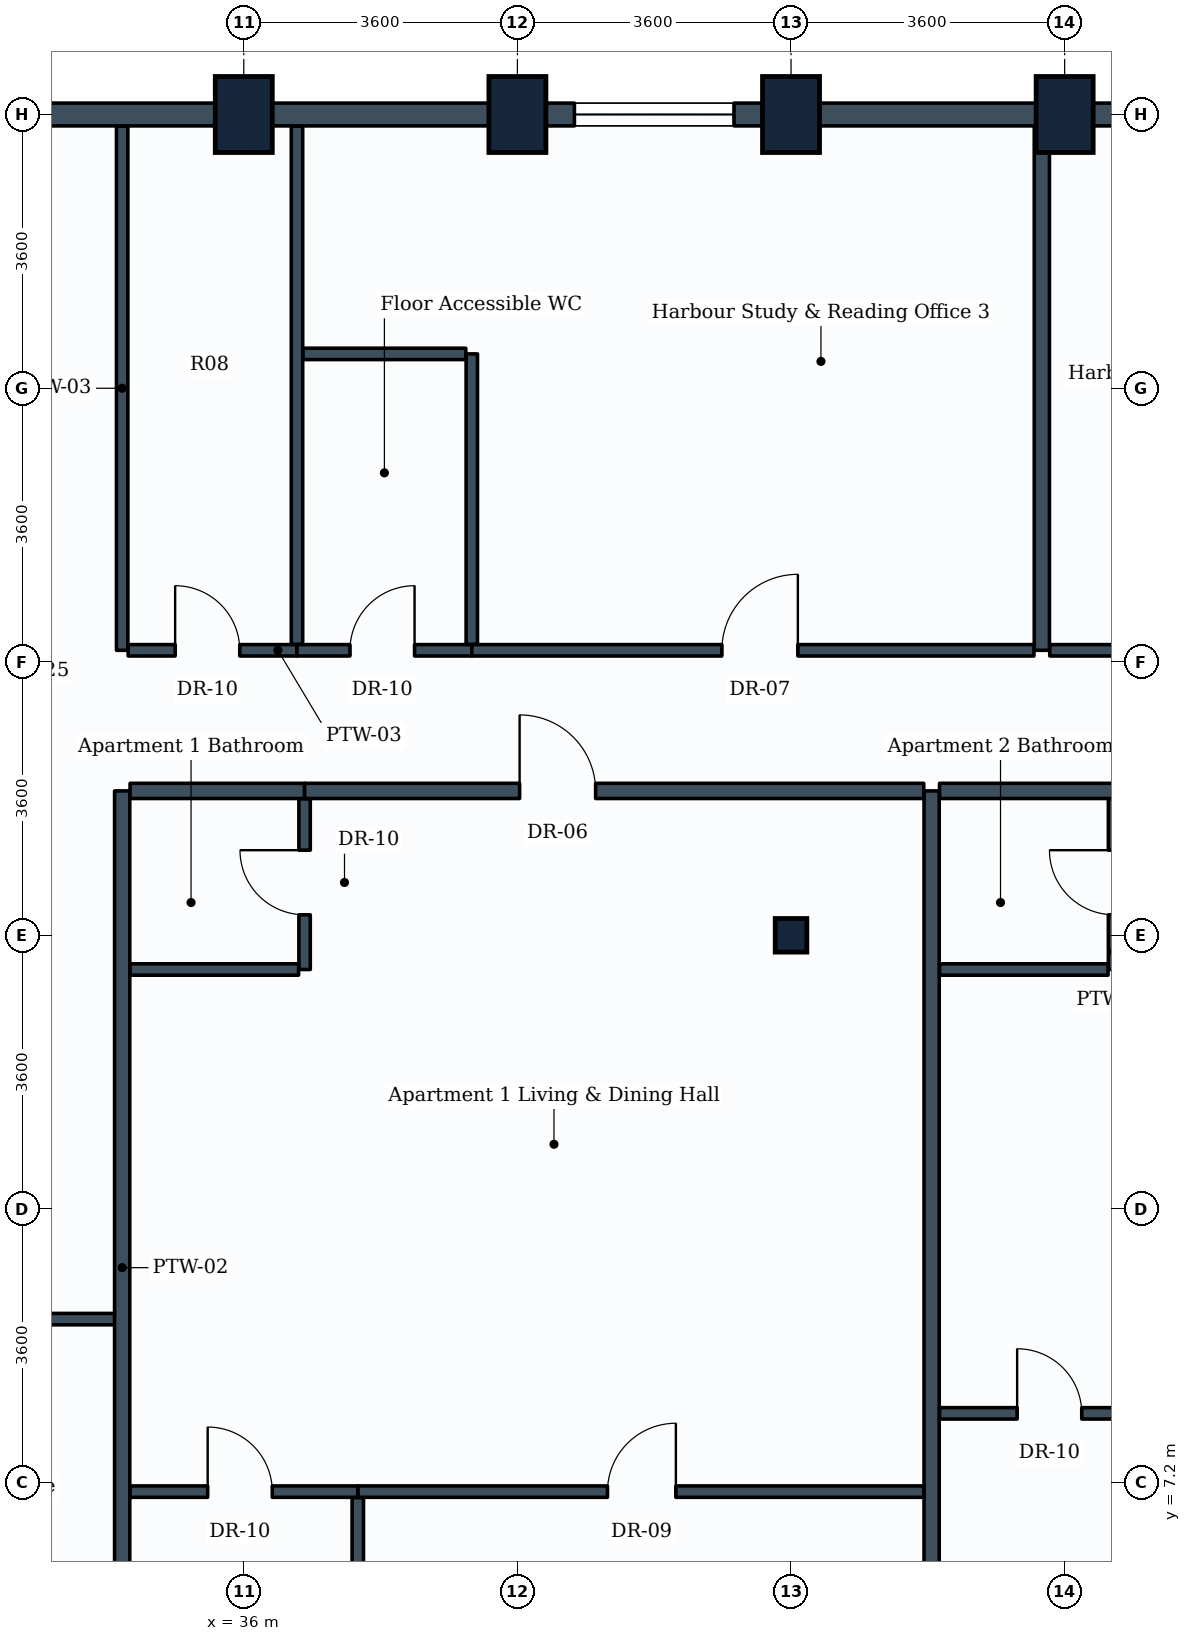
"""IFC4 building model, lengths in metres.
Left out: names, types, materials, properties, quantities, classifications, styles, units other than length and angle.
Written with IfcOpenShell. Run it as: python <this file> out.ifc"""

import sys

from ifc_helpers import new_model, si_unit, direction, frame, frame_2d, origin, origin_2d, place, context, subcontext, project, spatial, rectangle, i_section, extrude, element, fill, save


model = new_model("IFC4")
c1 = context("Model", 3, precision=1e-05, world=origin(), true_north=direction((0.0, 1.0)))
c2 = subcontext(c1, "Body", "Model", "MODEL_VIEW")
j1 = project(units=[si_unit("LENGTHUNIT", "METRE"), si_unit("PLANEANGLEUNIT", "RADIAN")], contexts=[c1])
p1 = place(None, origin())
s1 = spatial("IfcSite", under=j1, at=p1, CompositionType="ELEMENT")
p2 = place(p1, origin())
s2 = spatial("IfcBuilding", under=s1, at=p2, CompositionType="ELEMENT")
p3 = place(p2, frame((0.0, 0.0, 161.8)))
s3 = spatial("IfcBuildingStorey", under=s2, at=p3, CompositionType="ELEMENT", Elevation=161.8)
for number, where, z_axis, x_axis in (
    (1, (36.0, 25.2, 0.0), (0.0, 0.0, 1.0), (1.0, 0.0, 0.0)),
    (2, (39.6, 25.2, 0.0), (0.0, 0.0, 1.0), (1.0, 0.0, 0.0)),
):
    element("IfcColumn", number, at=place(p3, frame(where, z_axis=z_axis, x_axis=x_axis)), inside=s3, PredefinedType="COLUMN", context=c2, shape_type="SweptSolid", body=[
        extrude(rectangle(XDim=0.75, YDim=1.0, at=origin_2d()), origin(), (0.0, 0.0, 1.0), 3.8),
    ])
p4 = place(p3, frame((43.2, 14.4, 0.0), z_axis=(0.0, 0.0, 1.0), x_axis=(1.0, 0.0, 0.0)))
e3 = element("IfcColumn", 3, at=p4, inside=s3, PredefinedType="COLUMN", context=c2, shape_type="SweptSolid", body=[
    extrude(i_section(OverallWidth=0.416, OverallDepth=0.442, WebThickness=0.025, FlangeThickness=0.041, FilletRadius=0.015, at=origin_2d()), origin(), (0.0, 0.0, 1.0), 3.8),
])
for number, where, z_axis, x_axis in (
    (4, (43.2, 25.2, 0.0), (0.0, 0.0, 1.0), (1.0, 0.0, 0.0)),
    (5, (46.8, 25.2, 0.0), (0.0, 0.0, 1.0), (1.0, 0.0, 0.0)),
):
    element("IfcColumn", number, at=place(p3, frame(where, z_axis=z_axis, x_axis=x_axis)), inside=s3, PredefinedType="COLUMN", context=c2, shape_type="SweptSolid", body=[
        extrude(rectangle(XDim=0.75, YDim=1.0, at=origin_2d()), origin(), (0.0, 0.0, 1.0), 3.8),
    ])
p5 = place(p3, frame((46.8, 25.2, 0.0), z_axis=(0.0, 0.0, 1.0), x_axis=(1.0, 0.0, 0.0)))
e6 = element("IfcWall", 6, at=p5, inside=s3, PredefinedType="STANDARD", context=c2, shape_type="SweptSolid", body=[
    extrude(rectangle(XDim=3.6, YDim=0.3, at=frame_2d((1.8, 0.0))), origin(), (0.0, 0.0, 1.0), 2.93),
])
p6 = place(p5, frame((0.725, 0.0, 0.85)))
e7 = element("IfcOpeningElement", 7, at=p6, cuts=e6, PredefinedType="OPENING", context=c2, shape_type="SweptSolid", body=[
    extrude(rectangle(XDim=2.1, YDim=1.35, at=frame_2d((1.05, 0.675))), frame((0.0, 0.16, 0.0), z_axis=(0.0, -1.0, 0.0), x_axis=(1.0, 0.0, 0.0)), (0.0, 0.0, 1.0), 0.32),
])
p7 = place(p3, frame((43.2, 25.2, 0.0), z_axis=(0.0, 0.0, 1.0), x_axis=(1.0, 0.0, 0.0)))
e8 = element("IfcWall", 8, at=p7, inside=s3, PredefinedType="STANDARD", context=c2, shape_type="SweptSolid", body=[
    extrude(rectangle(XDim=3.6, YDim=0.3, at=frame_2d((1.8, 0.0))), origin(), (0.0, 0.0, 1.0), 2.93),
])
p8 = place(p3, frame((39.6, 25.2, 0.0), z_axis=(0.0, 0.0, 1.0), x_axis=(1.0, 0.0, 0.0)))
e9 = element("IfcWall", 9, at=p8, inside=s3, PredefinedType="STANDARD", context=c2, shape_type="SweptSolid", body=[
    extrude(rectangle(XDim=3.6, YDim=0.3, at=frame_2d((1.8, 0.0))), origin(), (0.0, 0.0, 1.0), 2.93),
])
p9 = place(p8, frame((0.75, 0.0, 0.85)))
e10 = element("IfcOpeningElement", 10, at=p9, cuts=e9, PredefinedType="OPENING", context=c2, shape_type="SweptSolid", body=[
    extrude(rectangle(XDim=2.1, YDim=1.35, at=frame_2d((1.05, 0.675))), frame((0.0, 0.16, 0.0), z_axis=(0.0, -1.0, 0.0), x_axis=(1.0, 0.0, 0.0)), (0.0, 0.0, 1.0), 0.32),
])
for number, where, z_axis, x_axis in (
    (11, (36.0, 25.2, 0.0), (0.0, 0.0, 1.0), (1.0, 0.0, 0.0)),
    (12, (32.4, 25.2, 0.0), (0.0, 0.0, 1.0), (1.0, 0.0, 0.0)),
):
    element("IfcWall", number, at=place(p3, frame(where, z_axis=z_axis, x_axis=x_axis)), inside=s3, PredefinedType="STANDARD", context=c2, shape_type="SweptSolid", body=[
        extrude(rectangle(XDim=3.6, YDim=0.3, at=frame_2d((1.8, 0.0))), origin(), (0.0, 0.0, 1.0), 2.93),
    ])
p10 = place(p3, frame((34.4, 18.15, 0.0), z_axis=(0.0, 0.0, 1.0), x_axis=(0.0, 1.0, 0.0)))
e13 = element("IfcWall", 13, at=p10, inside=s3, PredefinedType="PARTITIONING", context=c2, shape_type="SweptSolid", body=[
    extrude(rectangle(XDim=6.896, YDim=0.15, at=frame_2d((3.448, 0.0))), origin(), (0.0, 0.0, 1.0), 2.93),
])
p11 = place(p3, frame((34.479, 18.15, 0.0), z_axis=(0.0, 0.0, 1.0), x_axis=(1.0, 0.0, 0.0)))
e14 = element("IfcWall", 14, at=p11, inside=s3, PredefinedType="PARTITIONING", context=c2, shape_type="SweptSolid", body=[
    extrude(rectangle(XDim=2.221, YDim=0.15, at=frame_2d((1.11, 0.0))), origin(), (0.0, 0.0, 1.0), 3.17),
])
p12 = place(p11, frame((0.618, 0.0, 0.0)))
e15 = element("IfcOpeningElement", 15, at=p12, cuts=e14, PredefinedType="OPENING", context=c2, shape_type="SweptSolid", body=[
    extrude(rectangle(XDim=0.85, YDim=2.1, at=frame_2d((0.425, 1.05))), frame((0.0, 0.085, 0.0), z_axis=(0.0, -1.0, 0.0), x_axis=(1.0, 0.0, 0.0)), (0.0, 0.0, 1.0), 0.17),
])
p13 = place(p3, frame((36.7, 18.229, 0.0), z_axis=(0.0, 0.0, 1.0), x_axis=(0.0, 1.0, 0.0)))
e16 = element("IfcWall", 16, at=p13, inside=s3, PredefinedType="PARTITIONING", context=c2, shape_type="SweptSolid", body=[
    extrude(rectangle(XDim=6.817, YDim=0.15, at=frame_2d((3.408, 0.0))), origin(), (0.0, 0.0, 1.0), 2.93),
])
p14 = place(p3, frame((36.7, 18.15, 0.0), z_axis=(0.0, 0.0, 1.0), x_axis=(1.0, 0.0, 0.0)))
e17 = element("IfcWall", 17, at=p14, inside=s3, PredefinedType="PARTITIONING", context=c2, shape_type="SweptSolid", body=[
    extrude(rectangle(XDim=2.3, YDim=0.15, at=frame_2d((1.15, 0.0))), origin(), (0.0, 0.0, 1.0), 3.17),
])
p15 = place(p14, frame((0.697, 0.0, 0.0)))
e18 = element("IfcOpeningElement", 18, at=p15, cuts=e17, PredefinedType="OPENING", context=c2, shape_type="SweptSolid", body=[
    extrude(rectangle(XDim=0.85, YDim=2.1, at=frame_2d((0.425, 1.05))), frame((0.0, 0.085, 0.0), z_axis=(0.0, -1.0, 0.0), x_axis=(1.0, 0.0, 0.0)), (0.0, 0.0, 1.0), 0.17),
])
p16 = place(p3, frame((39.0, 18.229, 0.0), z_axis=(0.0, 0.0, 1.0), x_axis=(0.0, 1.0, 0.0)))
e19 = element("IfcWall", 19, at=p16, inside=s3, PredefinedType="PARTITIONING", context=c2, shape_type="SweptSolid", body=[
    extrude(rectangle(XDim=3.821, YDim=0.15, at=frame_2d((1.911, 0.0))), origin(), (0.0, 0.0, 1.0), 3.17),
])
p17 = place(p3, frame((36.779, 22.05, 0.0), z_axis=(0.0, 0.0, 1.0), x_axis=(1.0, 0.0, 0.0)))
e20 = element("IfcWall", 20, at=p17, inside=s3, PredefinedType="PARTITIONING", context=c2, shape_type="SweptSolid", body=[
    extrude(rectangle(XDim=2.142, YDim=0.15, at=frame_2d((1.071, 0.0))), origin(), (0.0, 0.0, 1.0), 3.535),
])
p18 = place(p3, frame((28.879, 9.35, 0.0), z_axis=(0.0, 0.0, 1.0), x_axis=(1.0, 0.0, 0.0)))
e21 = element("IfcWall", 21, at=p18, inside=s3, PredefinedType="PARTITIONING", context=c2, shape_type="SweptSolid", body=[
    extrude(rectangle(XDim=5.521, YDim=0.15, at=frame_2d((2.76, 0.0))), origin(), (0.0, 0.0, 1.0), 3.535),
])
p19 = place(p18, frame((0.36, 0.0, 0.0)))
e22 = element("IfcOpeningElement", 22, at=p19, cuts=e21, PredefinedType="OPENING", context=c2, shape_type="SweptSolid", body=[
    extrude(rectangle(XDim=1.0, YDim=2.1, at=frame_2d((0.5, 1.05))), frame((0.0, 0.085, 0.0), z_axis=(0.0, -1.0, 0.0), x_axis=(1.0, 0.0, 0.0)), (0.0, 0.0, 1.0), 0.17),
])
for number, where, z_axis, x_axis in (
    (23, (34.4, 3.754, 0.0), (0.0, 0.0, 1.0), (0.0, 1.0, 0.0)),
    (24, (45.05, 3.754, 0.0), (0.0, 0.0, 1.0), (0.0, 1.0, 0.0)),
):
    element("IfcWall", number, at=place(p3, frame(where, z_axis=z_axis, x_axis=x_axis)), inside=s3, PredefinedType="PARTITIONING", context=c2, shape_type="SweptSolid", body=[
        extrude(rectangle(XDim=12.546, YDim=0.2, at=frame_2d((6.273, 0.0))), origin(), (0.0, 0.0, 1.0), 2.93),
    ])
p20 = place(p3, frame((34.504, 16.3, 0.0), z_axis=(0.0, 0.0, 1.0), x_axis=(1.0, 0.0, 0.0)))
e25 = element("IfcWall", 25, at=p20, inside=s3, PredefinedType="PARTITIONING", context=c2, shape_type="SweptSolid", body=[
    extrude(rectangle(XDim=2.296, YDim=0.2, at=frame_2d((1.148, 0.0))), origin(), (0.0, 0.0, 1.0), 3.22),
])
p21 = place(p3, frame((36.8, 13.95, 0.0), z_axis=(0.0, 0.0, 1.0), x_axis=(0.0, 1.0, 0.0)))
e26 = element("IfcWall", 26, at=p21, inside=s3, PredefinedType="PARTITIONING", context=c2, shape_type="SweptSolid", body=[
    extrude(rectangle(XDim=2.246, YDim=0.15, at=frame_2d((1.123, 0.0))), origin(), (0.0, 0.0, 1.0), 3.17),
])
p22 = place(p21, frame((0.72, 0.0, 0.0)))
e27 = element("IfcOpeningElement", 27, at=p22, cuts=e26, PredefinedType="OPENING", context=c2, shape_type="SweptSolid", body=[
    extrude(rectangle(XDim=0.85, YDim=2.1, at=frame_2d((0.425, 1.05))), frame((0.0, 0.085, 0.0), z_axis=(0.0, -1.0, 0.0), x_axis=(1.0, 0.0, 0.0)), (0.0, 0.0, 1.0), 0.17),
])
p23 = place(p3, frame((34.504, 13.95, 0.0), z_axis=(0.0, 0.0, 1.0), x_axis=(1.0, 0.0, 0.0)))
e28 = element("IfcWall", 28, at=p23, inside=s3, PredefinedType="PARTITIONING", context=c2, shape_type="SweptSolid", body=[
    extrude(rectangle(XDim=2.217, YDim=0.15, at=frame_2d((1.108, 0.0))), origin(), (0.0, 0.0, 1.0), 3.22),
])
p24 = place(p3, frame((36.8, 16.3, 0.0), z_axis=(0.0, 0.0, 1.0), x_axis=(1.0, 0.0, 0.0)))
e29 = element("IfcWall", 29, at=p24, inside=s3, PredefinedType="PARTITIONING", context=c2, shape_type="SweptSolid", body=[
    extrude(rectangle(XDim=8.146, YDim=0.2, at=frame_2d((4.073, 0.0))), origin(), (0.0, 0.0, 1.0), 3.17),
])
p25 = place(p24, frame((2.829, 0.0, 0.0)))
e30 = element("IfcOpeningElement", 30, at=p25, cuts=e29, PredefinedType="OPENING", context=c2, shape_type="SweptSolid", body=[
    extrude(rectangle(XDim=1.0, YDim=2.1, at=frame_2d((0.5, 1.05))), frame((0.0, 0.11, 0.0), z_axis=(0.0, -1.0, 0.0), x_axis=(1.0, 0.0, 0.0)), (0.0, 0.0, 1.0), 0.22),
])
p26 = place(p3, frame((37.5, 7.08, 0.0), z_axis=(0.0, 0.0, 1.0), x_axis=(1.0, 0.0, 0.0)))
e31 = element("IfcWall", 31, at=p26, inside=s3, PredefinedType="PARTITIONING", context=c2, shape_type="SweptSolid", body=[
    extrude(rectangle(XDim=7.446, YDim=0.15, at=frame_2d((3.723, 0.0))), origin(), (0.0, 0.0, 1.0), 3.17),
])
p27 = place(p26, frame((3.285, 0.0, 0.0)))
e32 = element("IfcOpeningElement", 32, at=p27, cuts=e31, PredefinedType="OPENING", context=c2, shape_type="SweptSolid", body=[
    extrude(rectangle(XDim=0.9, YDim=2.1, at=frame_2d((0.45, 1.05))), frame((0.0, 0.085, 0.0), z_axis=(0.0, -1.0, 0.0), x_axis=(1.0, 0.0, 0.0)), (0.0, 0.0, 1.0), 0.17),
])
p28 = place(p3, frame((34.504, 7.08, 0.0), z_axis=(0.0, 0.0, 1.0), x_axis=(1.0, 0.0, 0.0)))
e33 = element("IfcWall", 33, at=p28, inside=s3, PredefinedType="PARTITIONING", context=c2, shape_type="SweptSolid", body=[
    extrude(rectangle(XDim=2.996, YDim=0.15, at=frame_2d((1.498, 0.0))), origin(), (0.0, 0.0, 1.0), 3.17),
])
p29 = place(p28, frame((1.021, 0.0, 0.0)))
e34 = element("IfcOpeningElement", 34, at=p29, cuts=e33, PredefinedType="OPENING", context=c2, shape_type="SweptSolid", body=[
    extrude(rectangle(XDim=0.85, YDim=2.1, at=frame_2d((0.425, 1.05))), frame((0.0, 0.085, 0.0), z_axis=(0.0, -1.0, 0.0), x_axis=(1.0, 0.0, 0.0)), (0.0, 0.0, 1.0), 0.17),
])
p30 = place(p3, frame((37.5, 3.754, 0.0), z_axis=(0.0, 0.0, 1.0), x_axis=(0.0, 1.0, 0.0)))
e35 = element("IfcWall", 35, at=p30, inside=s3, PredefinedType="PARTITIONING", context=c2, shape_type="SweptSolid", body=[
    extrude(rectangle(XDim=3.247, YDim=0.15, at=frame_2d((1.624, 0.0))), origin(), (0.0, 0.0, 1.0), 2.93),
])
p31 = place(p3, frame((45.154, 16.3, 0.0), z_axis=(0.0, 0.0, 1.0), x_axis=(1.0, 0.0, 0.0)))
e36 = element("IfcWall", 36, at=p31, inside=s3, PredefinedType="PARTITIONING", context=c2, shape_type="SweptSolid", body=[
    extrude(rectangle(XDim=2.296, YDim=0.2, at=frame_2d((1.148, 0.0))), origin(), (0.0, 0.0, 1.0), 3.17),
])
p32 = place(p3, frame((47.45, 13.95, 0.0), z_axis=(0.0, 0.0, 1.0), x_axis=(0.0, 1.0, 0.0)))
e37 = element("IfcWall", 37, at=p32, inside=s3, PredefinedType="PARTITIONING", context=c2, shape_type="SweptSolid", body=[
    extrude(rectangle(XDim=2.246, YDim=0.15, at=frame_2d((1.123, 0.0))), origin(), (0.0, 0.0, 1.0), 3.17),
])
p33 = place(p32, frame((0.72, 0.0, 0.0)))
e38 = element("IfcOpeningElement", 38, at=p33, cuts=e37, PredefinedType="OPENING", context=c2, shape_type="SweptSolid", body=[
    extrude(rectangle(XDim=0.85, YDim=2.1, at=frame_2d((0.425, 1.05))), frame((0.0, 0.085, 0.0), z_axis=(0.0, -1.0, 0.0), x_axis=(1.0, 0.0, 0.0)), (0.0, 0.0, 1.0), 0.17),
])
p34 = place(p3, frame((45.154, 13.95, 0.0), z_axis=(0.0, 0.0, 1.0), x_axis=(1.0, 0.0, 0.0)))
e39 = element("IfcWall", 39, at=p34, inside=s3, PredefinedType="PARTITIONING", context=c2, shape_type="SweptSolid", body=[
    extrude(rectangle(XDim=2.217, YDim=0.15, at=frame_2d((1.108, 0.0))), origin(), (0.0, 0.0, 1.0), 3.17),
])
p35 = place(p3, frame((45.154, 8.11, 0.0), z_axis=(0.0, 0.0, 1.0), x_axis=(1.0, 0.0, 0.0)))
e40 = element("IfcWall", 40, at=p35, inside=s3, PredefinedType="PARTITIONING", context=c2, shape_type="SweptSolid", body=[
    extrude(rectangle(XDim=2.996, YDim=0.15, at=frame_2d((1.498, 0.0))), origin(), (0.0, 0.0, 1.0), 3.17),
])
p36 = place(p35, frame((1.021, 0.0, 0.0)))
e41 = element("IfcOpeningElement", 41, at=p36, cuts=e40, PredefinedType="OPENING", context=c2, shape_type="SweptSolid", body=[
    extrude(rectangle(XDim=0.85, YDim=2.1, at=frame_2d((0.425, 1.05))), frame((0.0, 0.085, 0.0), z_axis=(0.0, -1.0, 0.0), x_axis=(1.0, 0.0, 0.0)), (0.0, 0.0, 1.0), 0.17),
])
p37 = place(p3, frame((46.5, 18.15, 0.0), z_axis=(0.0, 0.0, 1.0), x_axis=(0.0, 1.0, 0.0)))
e42 = element("IfcWall", 42, at=p37, inside=s3, PredefinedType="PARTITIONING", context=c2, shape_type="SweptSolid", body=[
    extrude(rectangle(XDim=6.896, YDim=0.2, at=frame_2d((3.448, 0.0))), origin(), (0.0, 0.0, 1.0), 2.93),
])
p38 = place(p3, frame((39.0, 18.15, 0.0), z_axis=(0.0, 0.0, 1.0), x_axis=(1.0, 0.0, 0.0)))
e43 = element("IfcWall", 43, at=p38, inside=s3, PredefinedType="PARTITIONING", context=c2, shape_type="SweptSolid", body=[
    extrude(rectangle(XDim=7.396, YDim=0.15, at=frame_2d((3.698, 0.0))), origin(), (0.0, 0.0, 1.0), 3.17),
])
p39 = place(p38, frame((3.29, 0.0, 0.0)))
e44 = element("IfcOpeningElement", 44, at=p39, cuts=e43, PredefinedType="OPENING", context=c2, shape_type="SweptSolid", body=[
    extrude(rectangle(XDim=1.0, YDim=2.1, at=frame_2d((0.5, 1.05))), frame((0.0, 0.085, 0.0), z_axis=(0.0, -1.0, 0.0), x_axis=(1.0, 0.0, 0.0)), (0.0, 0.0, 1.0), 0.17),
])
p40 = place(p3, frame((46.604, 18.15, 0.0), z_axis=(0.0, 0.0, 1.0), x_axis=(1.0, 0.0, 0.0)))
e45 = element("IfcWall", 45, at=p40, inside=s3, PredefinedType="PARTITIONING", context=c2, shape_type="SweptSolid", body=[
    extrude(rectangle(XDim=7.242, YDim=0.15, at=frame_2d((3.621, 0.0))), origin(), (0.0, 0.0, 1.0), 2.93),
])
p41 = place(p40, frame((3.186, 0.0, 0.0)))
e46 = element("IfcOpeningElement", 46, at=p41, cuts=e45, PredefinedType="OPENING", context=c2, shape_type="SweptSolid", body=[
    extrude(rectangle(XDim=1.0, YDim=2.1, at=frame_2d((0.5, 1.05))), frame((0.0, 0.085, 0.0), z_axis=(0.0, -1.0, 0.0), x_axis=(1.0, 0.0, 0.0)), (0.0, 0.0, 1.0), 0.17),
])
p42 = place(p9, origin())
e47 = element("IfcWindow", 47, at=p42, inside=s3, PartitioningType="SINGLE_PANEL", PredefinedType="WINDOW", context=c2, shape_type="SweptSolid", body=[
    extrude(rectangle(XDim=2.1, YDim=1.35, at=frame_2d((1.05, 0.675))), frame((0.0, 0.03, 0.0), z_axis=(0.0, -1.0, 0.0), x_axis=(1.0, 0.0, 0.0)), (0.0, 0.0, 1.0), 0.06),
])
fill(e10, e47)
p43 = place(p12, origin())
e48 = element("IfcDoor", 48, at=p43, inside=s3, OperationType="SINGLE_SWING_LEFT", PredefinedType="DOOR", context=c2, shape_type="SweptSolid", body=[
    extrude(rectangle(XDim=0.85, YDim=2.1, at=frame_2d((0.425, 1.05))), frame((0.0, 0.025, 0.0), z_axis=(0.0, -1.0, 0.0), x_axis=(1.0, 0.0, 0.0)), (0.0, 0.0, 1.0), 0.05),
])
fill(e15, e48)
p44 = place(p15, origin())
e49 = element("IfcDoor", 49, at=p44, inside=s3, OperationType="SINGLE_SWING_RIGHT", PredefinedType="DOOR", context=c2, shape_type="SweptSolid", body=[
    extrude(rectangle(XDim=0.85, YDim=2.1, at=frame_2d((0.425, 1.05))), frame((0.0, 0.025, 0.0), z_axis=(0.0, -1.0, 0.0), x_axis=(1.0, 0.0, 0.0)), (0.0, 0.0, 1.0), 0.05),
])
fill(e18, e49)
p45 = place(p22, origin())
e50 = element("IfcDoor", 50, at=p45, inside=s3, OperationType="SINGLE_SWING_RIGHT", PredefinedType="DOOR", context=c2, shape_type="SweptSolid", body=[
    extrude(rectangle(XDim=0.85, YDim=2.1, at=frame_2d((0.425, 1.05))), frame((0.0, 0.025, 0.0), z_axis=(0.0, -1.0, 0.0), x_axis=(1.0, 0.0, 0.0)), (0.0, 0.0, 1.0), 0.05),
])
fill(e27, e50)
p46 = place(p25, origin())
e51 = element("IfcDoor", 51, at=p46, inside=s3, OperationType="SINGLE_SWING_LEFT", PredefinedType="DOOR", context=c2, shape_type="SweptSolid", body=[
    extrude(rectangle(XDim=1.0, YDim=2.1, at=frame_2d((0.5, 1.05))), frame((0.0, 0.025, 0.0), z_axis=(0.0, -1.0, 0.0), x_axis=(1.0, 0.0, 0.0)), (0.0, 0.0, 1.0), 0.05),
])
fill(e30, e51)
p47 = place(p27, origin())
e52 = element("IfcDoor", 52, at=p47, inside=s3, OperationType="SINGLE_SWING_RIGHT", PredefinedType="DOOR", context=c2, shape_type="SweptSolid", body=[
    extrude(rectangle(XDim=0.9, YDim=2.1, at=frame_2d((0.45, 1.05))), frame((0.0, 0.025, 0.0), z_axis=(0.0, -1.0, 0.0), x_axis=(1.0, 0.0, 0.0)), (0.0, 0.0, 1.0), 0.05),
])
fill(e32, e52)
p48 = place(p29, origin())
e53 = element("IfcDoor", 53, at=p48, inside=s3, OperationType="SINGLE_SWING_LEFT", PredefinedType="DOOR", context=c2, shape_type="SweptSolid", body=[
    extrude(rectangle(XDim=0.85, YDim=2.1, at=frame_2d((0.425, 1.05))), frame((0.0, 0.025, 0.0), z_axis=(0.0, -1.0, 0.0), x_axis=(1.0, 0.0, 0.0)), (0.0, 0.0, 1.0), 0.05),
])
fill(e34, e53)
p49 = place(p36, origin())
e54 = element("IfcDoor", 54, at=p49, inside=s3, OperationType="SINGLE_SWING_LEFT", PredefinedType="DOOR", context=c2, shape_type="SweptSolid", body=[
    extrude(rectangle(XDim=0.85, YDim=2.1, at=frame_2d((0.425, 1.05))), frame((0.0, 0.025, 0.0), z_axis=(0.0, -1.0, 0.0), x_axis=(1.0, 0.0, 0.0)), (0.0, 0.0, 1.0), 0.05),
])
fill(e41, e54)
p50 = place(p39, origin())
e55 = element("IfcDoor", 55, at=p50, inside=s3, OperationType="SINGLE_SWING_RIGHT", PredefinedType="DOOR", context=c2, shape_type="SweptSolid", body=[
    extrude(rectangle(XDim=1.0, YDim=2.1, at=frame_2d((0.5, 1.05))), frame((0.0, 0.025, 0.0), z_axis=(0.0, -1.0, 0.0), x_axis=(1.0, 0.0, 0.0)), (0.0, 0.0, 1.0), 0.05),
])
fill(e44, e55)
save(model, sys.argv[1])
